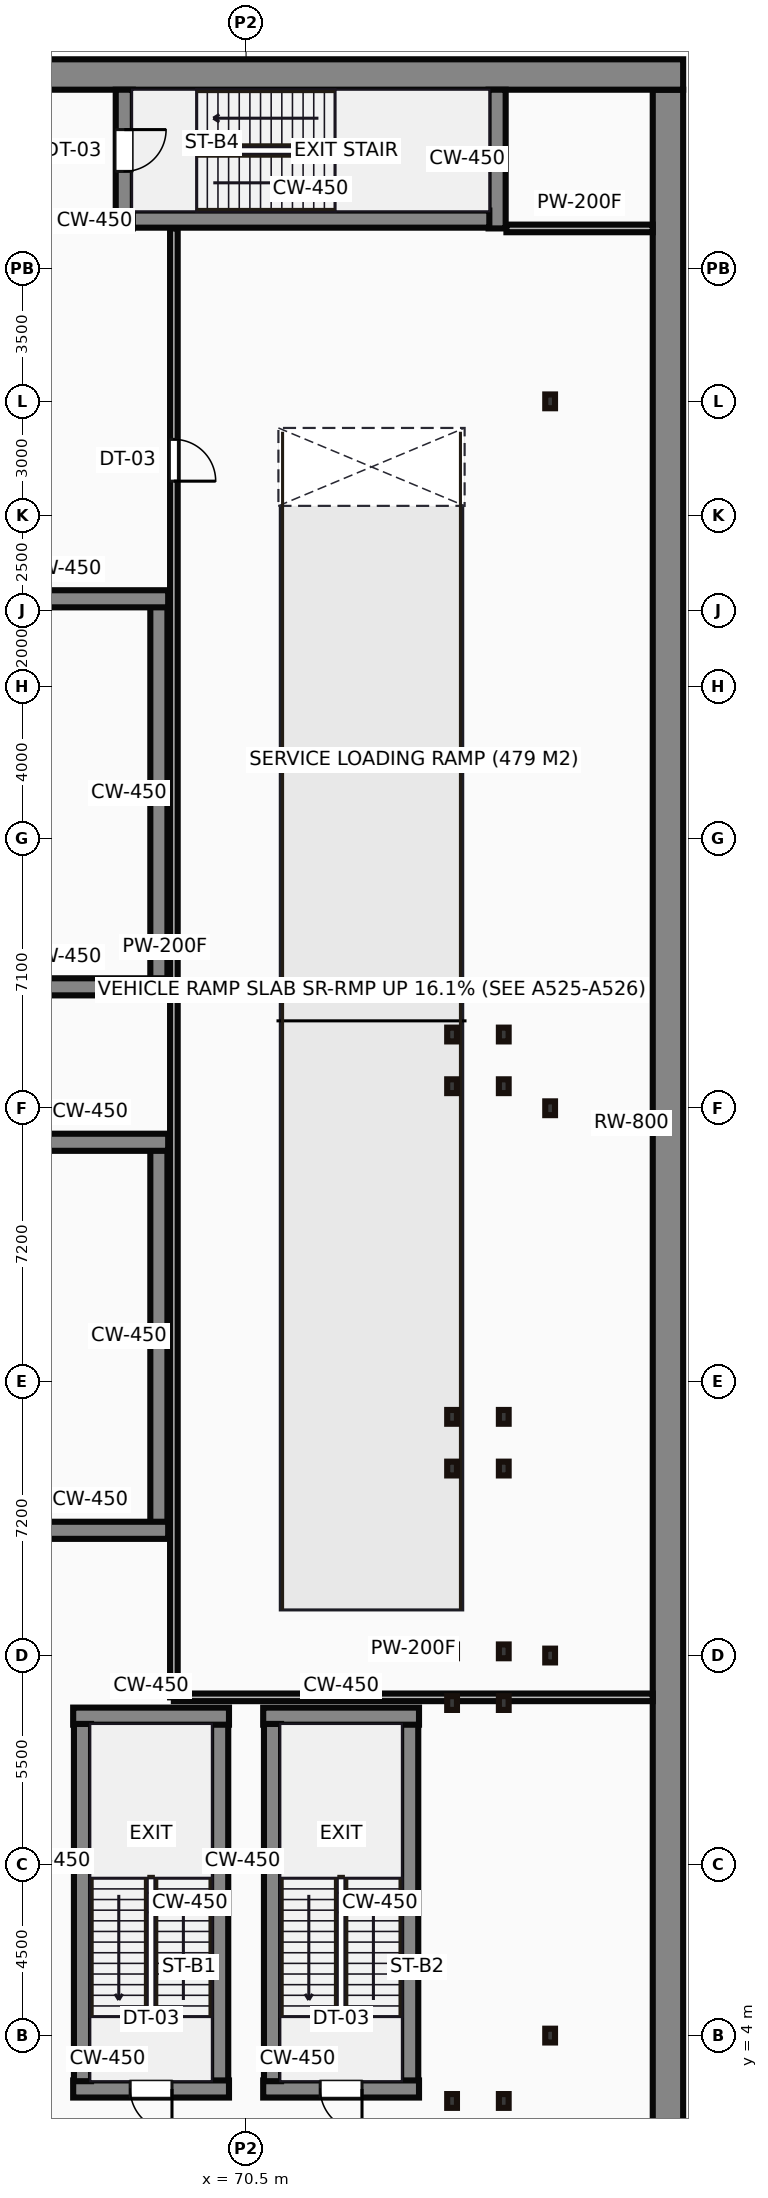
"""IFC4 building model, lengths in metres.
Left out: names, types, materials, properties, quantities, classifications, styles, units other than length and angle.
Written with IfcOpenShell. Run it as: python <this file> out.ifc"""

import sys

from ifc_helpers import new_model, si_unit, direction, frame, frame_2d, origin, origin_2d, place, context, subcontext, project, spatial, rectangle, i_section, extrude, source, transform, mapped, element, fill, save


model = new_model("IFC4")
c1 = context("Model", 3, precision=1e-05, world=origin(), true_north=direction((0.0, 1.0)))
c2 = subcontext(c1, "Body", "Model", "MODEL_VIEW")
j1 = project(units=[si_unit("LENGTHUNIT", "METRE"), si_unit("PLANEANGLEUNIT", "RADIAN")], contexts=[c1])
p1 = place(None, origin())
s1 = spatial("IfcSite", under=j1, at=p1, CompositionType="ELEMENT")
p2 = place(p1, origin())
s2 = spatial("IfcBuilding", under=s1, at=p2, CompositionType="ELEMENT")
p3 = place(p2, frame((0.0, 0.0, -5.0)))
s3 = spatial("IfcBuildingStorey", under=s2, at=p3, CompositionType="ELEMENT", Elevation=-5.0)
m1 = source(origin(), c2, "Body", "SweptSolid", [
    extrude(rectangle(XDim=82.0, YDim=0.8, at=frame_2d((41.0, 0.0))), origin(), (0.0, 0.0, 1.0), 5.0),
])
p4 = place(p3, frame((0.0, 55.6, 0.0), z_axis=(0.0, 0.0, 1.0), x_axis=(1.0, 0.0, 0.0)))
e1 = element("IfcWall", 1, at=p4, inside=s3, PredefinedType="USERDEFINED", context=c2, shape_type="MappedRepresentation", body=[
    mapped(m1, transform((0.0, 0.0, 0.0))),
])
m2 = source(origin(), c2, "Body", "SweptSolid", [
    extrude(rectangle(XDim=54.4, YDim=0.8, at=frame_2d((27.2, 0.0))), origin(), (0.0, 0.0, 1.0), 5.0),
])
p5 = place(p3, frame((81.6, 0.8, 0.0), z_axis=(0.0, 0.0, 1.0), x_axis=(0.0, 1.0, 0.0)))
e2 = element("IfcWall", 2, at=p5, inside=s3, PredefinedType="USERDEFINED", context=c2, shape_type="MappedRepresentation", body=[
    mapped(m2, transform((0.0, 0.0, 0.0))),
])
m3 = source(origin(), c2, "Body", "SweptSolid", [
    extrude(i_section(OverallWidth=0.257, OverallDepth=0.363, WebThickness=0.013, FlangeThickness=0.022, at=origin_2d()), origin(), (0.0, 0.0, 1.0), 5.0),
])
for number, where, z_axis, x_axis in (
    (3, (78.5, 4.0, 0.0), (0.0, 0.0, 1.0), (1.0, 0.0, 0.0)),
    (4, (78.5, 14.0, 0.0), (0.0, 0.0, 1.0), (1.0, 0.0, 0.0)),
    (5, (78.5, 28.4, 0.0), (0.0, 0.0, 1.0), (1.0, 0.0, 0.0)),
    (6, (78.5, 47.0, 0.0), (0.0, 0.0, 1.0), (1.0, 0.0, 0.0)),
):
    element("IfcColumn", number, at=place(p3, frame(where, z_axis=z_axis, x_axis=x_axis)), inside=s3, PredefinedType="COLUMN", context=c2, shape_type="MappedRepresentation", body=[
        mapped(m3, transform((0.0, 0.0, 0.0))),
    ])
m4 = source(origin(), c2, "Body", "SweptSolid", [
    extrude(rectangle(XDim=4.1, YDim=0.45, at=frame_2d((2.05, 0.0))), origin(), (0.0, 0.0, 1.0), 5.0),
])
p6 = place(p3, frame((64.35, 17.295, 0.0), z_axis=(0.0, 0.0, 1.0), x_axis=(1.0, 0.0, 0.0)))
e7 = element("IfcWall", 7, at=p6, inside=s3, PredefinedType="SHEAR", context=c2, shape_type="MappedRepresentation", body=[
    mapped(m4, transform((0.0, 0.0, 0.0))),
])
m5 = source(origin(), c2, "Body", "SweptSolid", [
    extrude(rectangle(XDim=9.8, YDim=0.45, at=frame_2d((4.9, 0.0))), origin(), (0.0, 0.0, 1.0), 5.0),
])
p7 = place(p3, frame((68.205, 17.5, 0.0), z_axis=(0.0, 0.0, 1.0), x_axis=(0.0, 1.0, 0.0)))
e8 = element("IfcWall", 8, at=p7, inside=s3, PredefinedType="SHEAR", context=c2, shape_type="MappedRepresentation", body=[
    mapped(m5, transform((0.0, 0.0, 0.0))),
])
p8 = place(p3, frame((64.35, 27.505, 0.0), z_axis=(0.0, 0.0, 1.0), x_axis=(1.0, 0.0, 0.0)))
e9 = element("IfcWall", 9, at=p8, inside=s3, PredefinedType="SHEAR", context=c2, shape_type="MappedRepresentation", body=[
    mapped(m4, transform((0.0, 0.0, 0.0))),
])
m6 = source(origin(), c2, "Body", "SweptSolid", [
    extrude(rectangle(XDim=5.5, YDim=0.45, at=frame_2d((2.75, 0.0))), origin(), (0.0, 0.0, 1.0), 5.0),
])
p9 = place(p3, frame((62.95, 31.595, 0.0), z_axis=(0.0, 0.0, 1.0), x_axis=(1.0, 0.0, 0.0)))
e10 = element("IfcWall", 10, at=p9, inside=s3, PredefinedType="SHEAR", context=c2, shape_type="MappedRepresentation", body=[
    mapped(m6, transform((0.0, 0.0, 0.0))),
])
p10 = place(p3, frame((68.205, 31.8, 0.0), z_axis=(0.0, 0.0, 1.0), x_axis=(0.0, 1.0, 0.0)))
e11 = element("IfcWall", 11, at=p10, inside=s3, PredefinedType="SHEAR", context=c2, shape_type="MappedRepresentation", body=[
    mapped(m5, transform((0.0, 0.0, 0.0))),
])
p11 = place(p3, frame((62.95, 41.805, 0.0), z_axis=(0.0, 0.0, 1.0), x_axis=(1.0, 0.0, 0.0)))
e12 = element("IfcWall", 12, at=p11, inside=s3, PredefinedType="SHEAR", context=c2, shape_type="MappedRepresentation", body=[
    mapped(m6, transform((0.0, 0.0, 0.0))),
])
m7 = source(origin(), c2, "Body", "SweptSolid", [
    extrude(rectangle(XDim=4.1, YDim=0.45, at=frame_2d((2.05, 0.0))), origin(), (0.0, 0.0, 1.0), 5.0),
])
p12 = place(p3, frame((65.95, 2.595, 0.0), z_axis=(0.0, 0.0, 1.0), x_axis=(1.0, 0.0, 0.0)))
e13 = element("IfcWall", 13, at=p12, inside=s3, PredefinedType="SHEAR", context=c2, shape_type="MappedRepresentation", body=[
    mapped(m7, transform((0.0, 0.0, 0.0))),
])
p13 = place(p12, frame((1.5, 0.0, 0.0)))
e14 = element("IfcOpeningElement", 14, at=p13, cuts=e13, PredefinedType="OPENING", context=c2, shape_type="SweptSolid", body=[
    extrude(rectangle(XDim=1.1, YDim=2.15, at=frame_2d((0.55, 1.075))), frame((0.0, 0.235, 0.0), z_axis=(0.0, -1.0, 0.0), x_axis=(1.0, 0.0, 0.0)), (0.0, 0.0, 1.0), 0.47),
])
m8 = source(origin(), c2, "Body", "SweptSolid", [
    extrude(rectangle(XDim=9.4, YDim=0.45, at=frame_2d((4.7, 0.0))), origin(), (0.0, 0.0, 1.0), 5.0),
])
for number, where, z_axis, x_axis in (
    (15, (66.195, 2.8, 0.0), (0.0, 0.0, 1.0), (0.0, 1.0, 0.0)),
    (16, (69.805, 2.8, 0.0), (0.0, 0.0, 1.0), (0.0, 1.0, 0.0)),
):
    element("IfcWall", number, at=place(p3, frame(where, z_axis=z_axis, x_axis=x_axis)), inside=s3, PredefinedType="SHEAR", context=c2, shape_type="MappedRepresentation", body=[
        mapped(m8, transform((0.0, 0.0, 0.0))),
    ])
p14 = place(p3, frame((65.95, 12.405, 0.0), z_axis=(0.0, 0.0, 1.0), x_axis=(1.0, 0.0, 0.0)))
e17 = element("IfcWall", 17, at=p14, inside=s3, PredefinedType="SHEAR", context=c2, shape_type="MappedRepresentation", body=[
    mapped(m7, transform((0.0, 0.0, 0.0))),
])
p15 = place(p3, frame((70.95, 2.595, 0.0), z_axis=(0.0, 0.0, 1.0), x_axis=(1.0, 0.0, 0.0)))
e18 = element("IfcWall", 18, at=p15, inside=s3, PredefinedType="SHEAR", context=c2, shape_type="MappedRepresentation", body=[
    mapped(m7, transform((0.0, 0.0, 0.0))),
])
p16 = place(p15, frame((1.5, 0.0, 0.0)))
e19 = element("IfcOpeningElement", 19, at=p16, cuts=e18, PredefinedType="OPENING", context=c2, shape_type="SweptSolid", body=[
    extrude(rectangle(XDim=1.1, YDim=2.15, at=frame_2d((0.55, 1.075))), frame((0.0, 0.235, 0.0), z_axis=(0.0, -1.0, 0.0), x_axis=(1.0, 0.0, 0.0)), (0.0, 0.0, 1.0), 0.47),
])
for number, where, z_axis, x_axis in (
    (20, (71.195, 2.8, 0.0), (0.0, 0.0, 1.0), (0.0, 1.0, 0.0)),
    (21, (74.805, 2.8, 0.0), (0.0, 0.0, 1.0), (0.0, 1.0, 0.0)),
):
    element("IfcWall", number, at=place(p3, frame(where, z_axis=z_axis, x_axis=x_axis)), inside=s3, PredefinedType="SHEAR", context=c2, shape_type="MappedRepresentation", body=[
        mapped(m8, transform((0.0, 0.0, 0.0))),
    ])
p17 = place(p3, frame((70.95, 12.405, 0.0), z_axis=(0.0, 0.0, 1.0), x_axis=(1.0, 0.0, 0.0)))
e22 = element("IfcWall", 22, at=p17, inside=s3, PredefinedType="SHEAR", context=c2, shape_type="MappedRepresentation", body=[
    mapped(m7, transform((0.0, 0.0, 0.0))),
])
m9 = source(origin(), c2, "Body", "SweptSolid", [
    extrude(rectangle(XDim=3.65, YDim=0.45, at=frame_2d((1.825, 0.0))), origin(), (0.0, 0.0, 1.0), 5.0),
])
p18 = place(p3, frame((67.295, 51.55, 0.0), z_axis=(0.0, 0.0, 1.0), x_axis=(0.0, 1.0, 0.0)))
e23 = element("IfcWall", 23, at=p18, inside=s3, PredefinedType="SHEAR", context=c2, shape_type="MappedRepresentation", body=[
    mapped(m9, transform((0.0, 0.0, 0.0))),
])
p19 = place(p18, frame((1.5, 0.0, 0.0)))
e24 = element("IfcOpeningElement", 24, at=p19, cuts=e23, PredefinedType="OPENING", context=c2, shape_type="SweptSolid", body=[
    extrude(rectangle(XDim=1.1, YDim=2.15, at=frame_2d((0.55, 1.075))), frame((0.0, 0.235, 0.0), z_axis=(0.0, -1.0, 0.0), x_axis=(1.0, 0.0, 0.0)), (0.0, 0.0, 1.0), 0.47),
])
p20 = place(p3, frame((67.5, 51.795, 0.0), z_axis=(0.0, 0.0, 1.0), x_axis=(1.0, 0.0, 0.0)))
e25 = element("IfcWall", 25, at=p20, inside=s3, PredefinedType="SHEAR", context=c2, shape_type="MappedRepresentation", body=[
    mapped(m8, transform((0.0, 0.0, 0.0))),
])
p21 = place(p3, frame((77.105, 51.55, 0.0), z_axis=(0.0, 0.0, 1.0), x_axis=(0.0, 1.0, 0.0)))
e26 = element("IfcWall", 26, at=p21, inside=s3, PredefinedType="SHEAR", context=c2, shape_type="MappedRepresentation", body=[
    mapped(m9, transform((0.0, 0.0, 0.0))),
])
m10 = source(origin(), c2, "Body", "SweptSolid", [
    extrude(i_section(OverallWidth=0.257, OverallDepth=0.363, WebThickness=0.013, FlangeThickness=0.022, at=origin_2d()), origin(), (0.0, 0.0, 1.0), 4.8),
])
for number, where, z_axis, x_axis in (
    (27, (75.92, 2.28, 0.0), (0.0, 0.0, 1.0), (1.0, 0.0, 0.0)),
    (28, (77.28, 2.28, 0.0), (0.0, 0.0, 1.0), (1.0, 0.0, 0.0)),
):
    element("IfcColumn", number, at=place(p3, frame(where, z_axis=z_axis, x_axis=x_axis)), inside=s3, PredefinedType="COLUMN", context=c2, shape_type="MappedRepresentation", body=[
        mapped(m10, transform((0.0, 0.0, 0.0))),
    ])
for number, where, z_axis, x_axis in (
    (29, (75.92, 12.75, 0.0), (0.0, 0.0, 1.0), (1.0, 0.0, 0.0)),
    (30, (75.92, 14.11, 0.0), (0.0, 0.0, 1.0), (1.0, 0.0, 0.0)),
    (31, (77.28, 12.75, 0.0), (0.0, 0.0, 1.0), (1.0, 0.0, 0.0)),
    (32, (77.28, 14.11, 0.0), (0.0, 0.0, 1.0), (1.0, 0.0, 0.0)),
    (33, (75.92, 18.92, 0.0), (0.0, 0.0, 1.0), (1.0, 0.0, 0.0)),
    (34, (75.92, 20.28, 0.0), (0.0, 0.0, 1.0), (1.0, 0.0, 0.0)),
    (35, (77.28, 18.92, 0.0), (0.0, 0.0, 1.0), (1.0, 0.0, 0.0)),
    (36, (77.28, 20.28, 0.0), (0.0, 0.0, 1.0), (1.0, 0.0, 0.0)),
    (37, (75.92, 28.98, 0.0), (0.0, 0.0, 1.0), (1.0, 0.0, 0.0)),
    (38, (75.92, 30.34, 0.0), (0.0, 0.0, 1.0), (1.0, 0.0, 0.0)),
    (39, (77.28, 28.98, 0.0), (0.0, 0.0, 1.0), (1.0, 0.0, 0.0)),
    (40, (77.28, 30.34, 0.0), (0.0, 0.0, 1.0), (1.0, 0.0, 0.0)),
):
    element("IfcColumn", number, at=place(p3, frame(where, z_axis=z_axis, x_axis=x_axis)), inside=s3, PredefinedType="COLUMN", context=c2, shape_type="MappedRepresentation", body=[
        mapped(m3, transform((0.0, 0.0, 0.0))),
    ])
m11 = source(origin(), c2, "Body", "SweptSolid", [
    extrude(rectangle(XDim=38.65, YDim=0.2, at=frame_2d((19.325, 0.0))), origin(), (0.0, 0.0, 1.0), 4.7),
])
p22 = place(p3, frame((68.6, 12.9, 0.0), z_axis=(0.0, 0.0, 1.0), x_axis=(0.0, 1.0, 0.0)))
e41 = element("IfcWall", 41, at=p22, inside=s3, PredefinedType="PARTITIONING", context=c2, shape_type="MappedRepresentation", body=[
    mapped(m11, transform((0.0, 0.0, 0.0))),
])
p23 = place(p22, frame((32.0, 0.0, 0.0)))
e42 = element("IfcOpeningElement", 42, at=p23, cuts=e41, PredefinedType="OPENING", context=c2, shape_type="SweptSolid", body=[
    extrude(rectangle(XDim=1.1, YDim=2.15, at=frame_2d((0.55, 1.075))), frame((0.0, 0.11, 0.0), z_axis=(0.0, -1.0, 0.0), x_axis=(1.0, 0.0, 0.0)), (0.0, 0.0, 1.0), 0.22),
])
m12 = source(origin(), c2, "Body", "SweptSolid", [
    extrude(rectangle(XDim=12.6, YDim=0.2, at=frame_2d((6.3, 0.0))), origin(), (0.0, 0.0, 1.0), 4.7),
])
p24 = place(p3, frame((68.6, 12.9, 0.0), z_axis=(0.0, 0.0, 1.0), x_axis=(1.0, 0.0, 0.0)))
e43 = element("IfcWall", 43, at=p24, inside=s3, PredefinedType="PARTITIONING", context=c2, shape_type="MappedRepresentation", body=[
    mapped(m12, transform((0.0, 0.0, 0.0))),
])
m13 = source(origin(), c2, "Body", "SweptSolid", [
    extrude(rectangle(XDim=3.85, YDim=0.2, at=frame_2d((1.925, 0.0))), origin(), (0.0, 0.0, 1.0), 4.7),
])
p25 = place(p3, frame((77.35, 51.55, 0.0), z_axis=(0.0, 0.0, 1.0), x_axis=(1.0, 0.0, 0.0)))
e44 = element("IfcWall", 44, at=p25, inside=s3, PredefinedType="PARTITIONING", context=c2, shape_type="MappedRepresentation", body=[
    mapped(m13, transform((0.0, 0.0, 0.0))),
])
m14 = source(origin(), c2, "Body", "SweptSolid", [
    extrude(rectangle(XDim=1.1, YDim=2.15, at=frame_2d((0.55, 1.075))), frame((0.0, 0.025, 0.0), z_axis=(0.0, -1.0, 0.0), x_axis=(1.0, 0.0, 0.0)), (0.0, 0.0, 1.0), 0.05),
])
p26 = place(p23, origin())
e45 = element("IfcDoor", 45, at=p26, inside=s3, OperationType="SINGLE_SWING_LEFT", PredefinedType="DOOR", context=c2, shape_type="MappedRepresentation", body=[
    mapped(m14, transform((0.0, 0.0, 0.0))),
])
fill(e42, e45)
p27 = place(p13, origin())
e46 = element("IfcDoor", 46, at=p27, inside=s3, OperationType="SINGLE_SWING_RIGHT", PredefinedType="DOOR", context=c2, shape_type="MappedRepresentation", body=[
    mapped(m14, transform((0.0, 0.0, 0.0))),
])
fill(e14, e46)
p28 = place(p16, origin())
e47 = element("IfcDoor", 47, at=p28, inside=s3, OperationType="SINGLE_SWING_RIGHT", PredefinedType="DOOR", context=c2, shape_type="MappedRepresentation", body=[
    mapped(m14, transform((0.0, 0.0, 0.0))),
])
fill(e19, e47)
p29 = place(p19, frame((1.1, 0.0, 0.0), z_axis=(0.0, 0.0, 1.0), x_axis=(-1.0, 0.0, 0.0)))
e48 = element("IfcDoor", 48, at=p29, inside=s3, OperationType="SINGLE_SWING_RIGHT", PredefinedType="DOOR", context=c2, shape_type="MappedRepresentation", body=[
    mapped(m14, transform((0.0, 0.0, 0.0))),
])
fill(e24, e48)
save(model, sys.argv[1])
